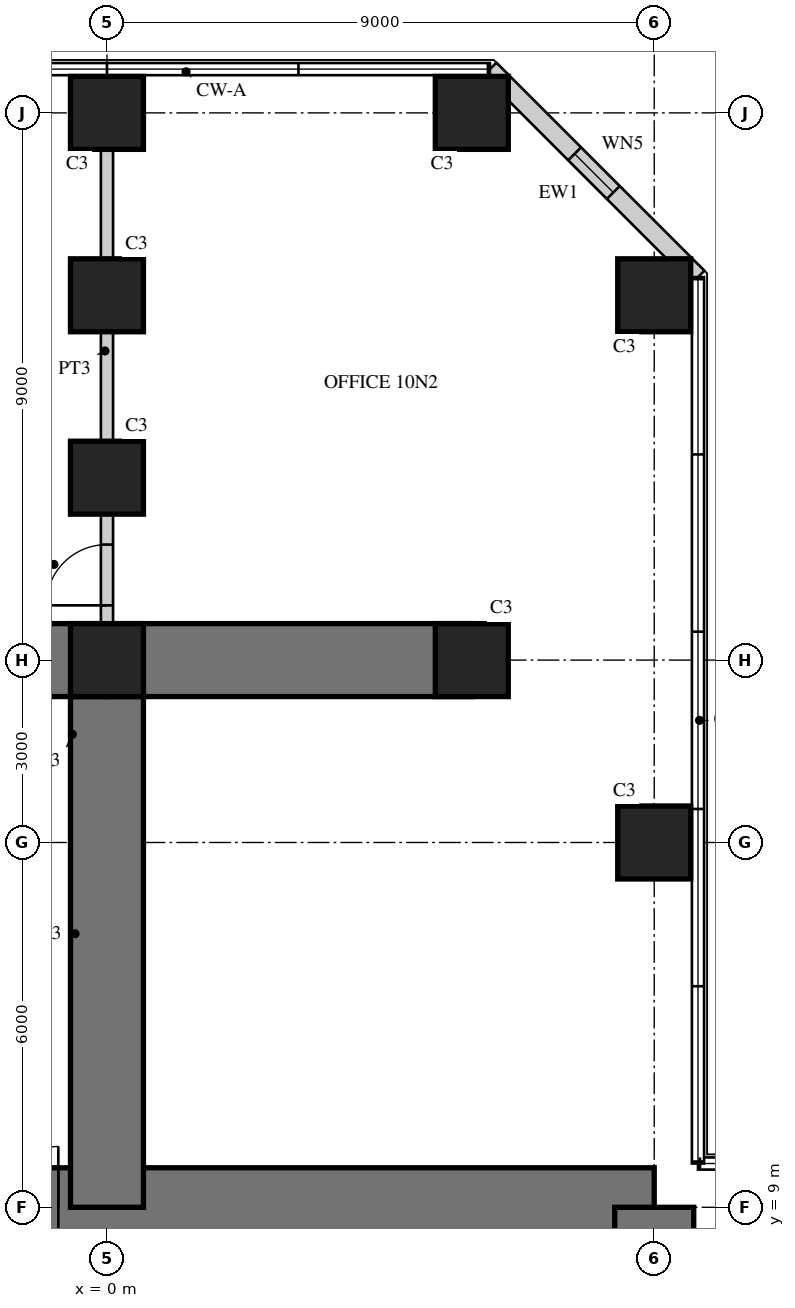
"""IFC4 building model, lengths in metres.
Left out: names, types, materials, properties, quantities, classifications, styles, units other than length and angle.
Written with IfcOpenShell. Run it as: python <this file> out.ifc"""

import sys

from ifc_helpers import new_model, si_unit, direction, frame, frame_2d, origin, origin_2d, place, context, subcontext, project, spatial, rectangle, hollow_rectangle, extrude, element, fill, save


model = new_model("IFC4")
c1 = context("Model", 3, precision=1e-05, world=origin(), true_north=direction((0.0, 1.0)))
c2 = subcontext(c1, "Body", "Model", "MODEL_VIEW")
j1 = project(units=[si_unit("LENGTHUNIT", "METRE"), si_unit("PLANEANGLEUNIT", "RADIAN")], contexts=[c1])
p1 = place(None, origin())
s1 = spatial("IfcSite", under=j1, at=p1, CompositionType="ELEMENT")
p2 = place(p1, origin())
s2 = spatial("IfcBuilding", under=s1, at=p2, CompositionType="ELEMENT")
p3 = place(p2, frame((0.0, 0.0, 43.5)))
s3 = spatial("IfcBuildingStorey", under=s2, at=p3, CompositionType="ELEMENT", Elevation=43.5)
p4 = place(p3, frame((9.0, 9.0, 0.0), z_axis=(0.0, 0.0, 1.0), x_axis=(-1.0, 0.0, 0.0)))
e1 = element("IfcWall", 1, at=p4, inside=s3, PredefinedType="SHEAR", context=c2, shape_type="SweptSolid", body=[
    extrude(rectangle(XDim=18.0, YDim=1.3, at=frame_2d((9.0, 0.0))), origin(), (0.0, 0.0, 1.0), 4.0),
])
p5 = place(p4, frame((9.8, 0.0, 0.0)))
e2 = element("IfcOpeningElement", 2, at=p5, cuts=e1, PredefinedType="OPENING", context=c2, shape_type="SweptSolid", body=[
    extrude(rectangle(XDim=1.0, YDim=2.4, at=frame_2d((0.5, 1.2))), frame((0.0, 0.66, 0.0), z_axis=(0.0, -1.0, 0.0), x_axis=(1.0, 0.0, 0.0)), (0.0, 0.0, 1.0), 1.32),
])
p6 = place(p3, frame((9.0, -9.0, 0.0), z_axis=(0.0, 0.0, 1.0), x_axis=(0.0, 1.0, 0.0)))
e3 = element("IfcWall", 3, at=p6, inside=s3, PredefinedType="SHEAR", context=c2, shape_type="SweptSolid", body=[
    extrude(rectangle(XDim=18.0, YDim=1.3, at=frame_2d((9.0, 0.0))), origin(), (0.0, 0.0, 1.0), 4.0),
])
p7 = place(p6, frame((9.8, 0.0, 0.0)))
e4 = element("IfcOpeningElement", 4, at=p7, cuts=e3, PredefinedType="OPENING", context=c2, shape_type="SweptSolid", body=[
    extrude(rectangle(XDim=1.0, YDim=2.4, at=frame_2d((0.5, 1.2))), frame((0.0, 0.66, 0.0), z_axis=(0.0, -1.0, 0.0), x_axis=(1.0, 0.0, 0.0)), (0.0, 0.0, 1.0), 1.32),
])
p8 = place(p3, frame((0.0, 9.0, 0.0), z_axis=(0.0, 0.0, 1.0), x_axis=(0.0, 1.0, 0.0)))
e5 = element("IfcWall", 5, at=p8, inside=s3, PredefinedType="SHEAR", context=c2, shape_type="SweptSolid", body=[
    extrude(rectangle(XDim=9.0, YDim=1.2, at=frame_2d((4.5, 0.0))), origin(), (0.0, 0.0, 1.0), 4.0),
])
for number, where, z_axis, x_axis in (
    (6, (0.0, 18.0, 0.0), (0.0, 0.0, 1.0), (-1.0, 0.0, 0.0)),
    (7, (0.0, 18.0, 0.0), (0.0, 0.0, 1.0), (1.0, 0.0, 0.0)),
):
    element("IfcWall", number, at=place(p3, frame(where, z_axis=z_axis, x_axis=x_axis)), inside=s3, PredefinedType="SHEAR", context=c2, shape_type="SweptSolid", body=[
        extrude(rectangle(XDim=6.0, YDim=1.2, at=frame_2d((3.0, 0.0))), origin(), (0.0, 0.0, 1.0), 4.0),
    ])
for number, where, z_axis, x_axis in (
    (8, (9.0, 15.0, 0.0), (0.0, 0.0, 1.0), (1.0, 0.0, 0.0)),
    (9, (9.0, 24.0, 0.0), (0.0, 0.0, 1.0), (1.0, 0.0, 0.0)),
    (10, (6.0, 27.0, 0.0), (0.0, 0.0, 1.0), (1.0, 0.0, 0.0)),
    (11, (0.0, 27.0, 0.0), (0.0, 0.0, 1.0), (1.0, 0.0, 0.0)),
    (12, (6.0, 18.0, 0.0), (0.0, 0.0, 1.0), (1.0, 0.0, 0.0)),
    (13, (0.0, 18.0, 0.0), (0.0, 0.0, 1.0), (1.0, 0.0, 0.0)),
    (14, (0.0, 21.0, 0.0), (0.0, 0.0, 1.0), (1.0, 0.0, 0.0)),
    (15, (0.0, 24.0, 0.0), (0.0, 0.0, 1.0), (1.0, 0.0, 0.0)),
):
    element("IfcColumn", number, at=place(p3, frame(where, z_axis=z_axis, x_axis=x_axis)), inside=s3, PredefinedType="COLUMN", context=c2, shape_type="SweptSolid", body=[
        extrude(rectangle(XDim=1.2, YDim=1.2, at=origin_2d()), origin(), (0.0, 0.0, 1.0), 4.0),
    ])
p9 = place(p3, frame((9.72, 24.298, 0.0), z_axis=(0.0, 0.0, 1.0), x_axis=(-0.707106781187, 0.707106781187, 0.0)))
e16 = element("IfcWall", 16, at=p9, inside=s3, PredefinedType="SOLIDWALL", context=c2, shape_type="SweptSolid", body=[
    extrude(rectangle(XDim=4.839, YDim=0.3, at=frame_2d((2.419, 0.0))), origin(), (0.0, 0.0, 1.0), 3.8),
])
p10 = place(p9, frame((1.969, 0.0, 0.3)))
e17 = element("IfcOpeningElement", 17, at=p10, cuts=e16, PredefinedType="OPENING", context=c2, shape_type="SweptSolid", body=[
    extrude(rectangle(XDim=0.9, YDim=2.4, at=frame_2d((0.45, 1.2))), frame((0.0, 0.16, 0.0), z_axis=(0.0, -1.0, 0.0), x_axis=(1.0, 0.0, 0.0)), (0.0, 0.0, 1.0), 0.32),
])
p11 = place(p3, frame((0.0, 18.0, 0.0), z_axis=(0.0, 0.0, 1.0), x_axis=(0.0, 1.0, 0.0)))
e18 = element("IfcWall", 18, at=p11, inside=s3, PredefinedType="SOLIDWALL", context=c2, shape_type="SweptSolid", body=[
    extrude(rectangle(XDim=3.0, YDim=0.2, at=frame_2d((1.5, 0.0))), origin(), (0.0, 0.0, 1.0), 3.8),
])
p12 = place(p11, frame((0.9, 0.0, 0.0)))
e19 = element("IfcOpeningElement", 19, at=p12, cuts=e18, PredefinedType="OPENING", context=c2, shape_type="SweptSolid", body=[
    extrude(rectangle(XDim=1.0, YDim=2.2, at=frame_2d((0.5, 1.1))), frame((0.0, 0.11, 0.0), z_axis=(0.0, -1.0, 0.0), x_axis=(1.0, 0.0, 0.0)), (0.0, 0.0, 1.0), 0.22),
])
p13 = place(p3, frame((0.0, 21.0, 0.0), z_axis=(0.0, 0.0, 1.0), x_axis=(0.0, 1.0, 0.0)))
e20 = element("IfcWall", 20, at=p13, inside=s3, PredefinedType="SOLIDWALL", context=c2, shape_type="SweptSolid", body=[
    extrude(rectangle(XDim=6.0, YDim=0.2, at=frame_2d((3.0, 0.0))), origin(), (0.0, 0.0, 1.0), 2.9),
])
p14 = place(p10, origin())
e21 = element("IfcWindow", 21, at=p14, inside=s3, PartitioningType="SINGLE_PANEL", PredefinedType="WINDOW", context=c2, shape_type="SweptSolid", body=[
    extrude(hollow_rectangle(XDim=0.9, YDim=2.4, WallThickness=0.06, at=frame_2d((0.45, 1.2))), frame((0.0, 0.03, 0.0), z_axis=(0.0, -1.0, 0.0), x_axis=(1.0, 0.0, 0.0)), (0.0, 0.0, 1.0), 0.06),
    extrude(rectangle(XDim=0.779, YDim=2.279, at=frame_2d((0.45, 1.2))), frame((0.0, 0.03, 0.0), z_axis=(0.0, -1.0, 0.0), x_axis=(1.0, 0.0, 0.0)), (0.0, 0.0, 1.0), 0.06),
])
fill(e17, e21)
p15 = place(p12, origin())
e22 = element("IfcDoor", 22, at=p15, inside=s3, OperationType="SINGLE_SWING_LEFT", PredefinedType="DOOR", context=c2, shape_type="SweptSolid", body=[
    extrude(rectangle(XDim=1.0, YDim=2.2, at=frame_2d((0.5, 1.1))), frame((0.0, 0.025, 0.0), z_axis=(0.0, -1.0, 0.0), x_axis=(1.0, 0.0, 0.0)), (0.0, 0.0, 1.0), 0.05),
])
fill(e19, e22)
p16 = place(p5, frame((1.0, 0.0, 0.0), z_axis=(0.0, 0.0, 1.0), x_axis=(-1.0, 0.0, 0.0)))
e23 = element("IfcDoor", 23, at=p16, inside=s3, OperationType="SINGLE_SWING_RIGHT", PredefinedType="DOOR", context=c2, shape_type="SweptSolid", body=[
    extrude(rectangle(XDim=1.0, YDim=2.4, at=frame_2d((0.5, 1.2))), frame((0.0, -0.005, 0.0), z_axis=(0.0, -1.0, 0.0), x_axis=(1.0, 0.0, 0.0)), (0.0, 0.0, 1.0), 0.05),
])
fill(e2, e23)
save(model, sys.argv[1])
